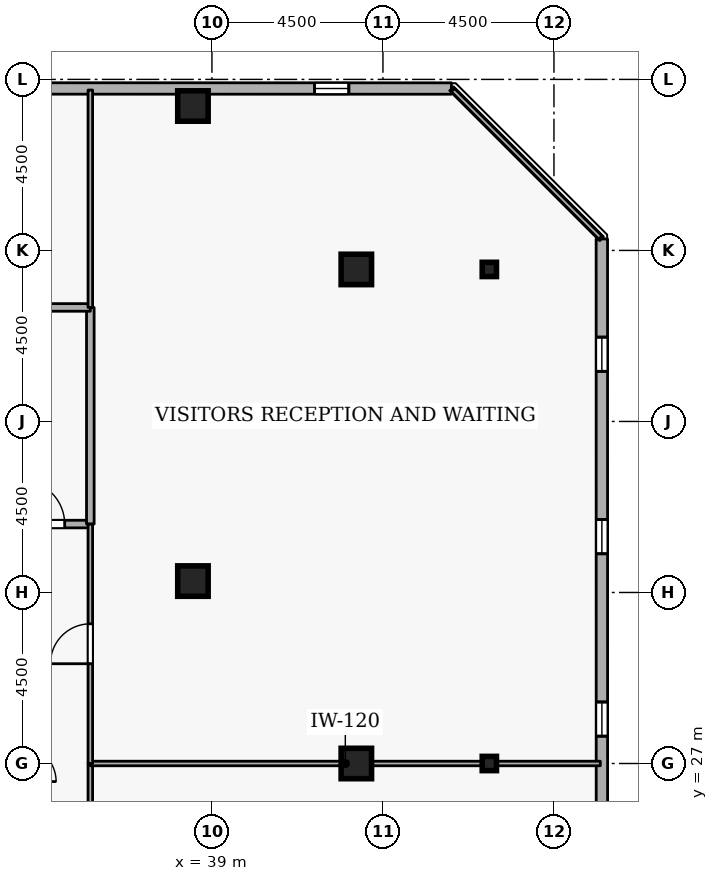
"""IFC4 building model, lengths in metres.
Left out: names, types, materials, properties, quantities, classifications, styles, units other than length and angle.
Written with IfcOpenShell. Run it as: python <this file> out.ifc"""

import sys

from ifc_helpers import new_model, si_unit, direction, frame, frame_2d, origin, origin_2d, place, context, subcontext, project, spatial, rectangle, i_section, extrude, element, fill, save


model = new_model("IFC4")
c1 = context("Model", 3, precision=1e-05, world=origin(), true_north=direction((0.0, 1.0)))
c2 = subcontext(c1, "Body", "Model", "MODEL_VIEW")
j1 = project(units=[si_unit("LENGTHUNIT", "METRE"), si_unit("PLANEANGLEUNIT", "RADIAN")], contexts=[c1])
p1 = place(None, origin())
s1 = spatial("IfcSite", under=j1, at=p1, CompositionType="ELEMENT")
p2 = place(p1, origin())
s2 = spatial("IfcBuilding", under=s1, at=p2, CompositionType="ELEMENT")
p3 = place(p2, frame((0.0, 0.0, 258.3)))
s3 = spatial("IfcBuildingStorey", under=s2, at=p3, CompositionType="ELEMENT", Elevation=258.3)
for number, where, z_axis, x_axis in (
    (1, (42.8, 27.0, 0.0), (0.0, 0.0, 1.0), (1.0, 0.0, 0.0)),
    (2, (42.8, 40.0, 0.0), (0.0, 0.0, 1.0), (1.0, 0.0, 0.0)),
    (3, (38.5, 44.3, 0.0), (0.0, 0.0, 1.0), (1.0, 0.0, 0.0)),
    (4, (38.5, 31.8, 0.0), (0.0, 0.0, 1.0), (1.0, 0.0, 0.0)),
):
    element("IfcColumn", number, at=place(p3, frame(where, z_axis=z_axis, x_axis=x_axis)), inside=s3, PredefinedType="COLUMN", context=c2, shape_type="SweptSolid", body=[
        extrude(rectangle(XDim=0.8, YDim=0.8, at=origin_2d()), origin(), (0.0, 0.0, 1.0), 3.6),
    ])
for number, where, z_axis, x_axis in (
    (5, (46.3, 27.0, 0.0), (0.0, 0.0, 1.0), (1.0, 0.0, 0.0)),
    (6, (46.3, 40.0, 0.0), (0.0, 0.0, 1.0), (1.0, 0.0, 0.0)),
):
    element("IfcColumn", number, at=place(p3, frame(where, z_axis=z_axis, x_axis=x_axis)), inside=s3, PredefinedType="COLUMN", context=c2, shape_type="SweptSolid", body=[
        extrude(i_section(OverallWidth=0.375, OverallDepth=0.375, WebThickness=0.017, FlangeThickness=0.027, FilletRadius=0.015, at=origin_2d()), origin(), (0.0, 0.0, 1.0), 3.6),
    ])
p4 = place(p3, frame((49.265, 5.819, 0.0), z_axis=(0.0, 0.0, 1.0), x_axis=(-0.000132597301, 0.999999991209, 0.0)))
e7 = element("IfcWall", 7, at=p4, inside=s3, PredefinedType="STANDARD", context=c2, shape_type="SweptSolid", body=[
    extrude(rectangle(XDim=34.983, YDim=0.3, at=frame_2d((17.492, 0.0))), origin(), (0.0, 0.0, 1.0), 2.7),
])
p5 = place(p4, frame((2.7, 0.0, 0.72)))
e8 = element("IfcOpeningElement", 8, at=p5, cuts=e7, PredefinedType="OPENING", context=c2, shape_type="SweptSolid", body=[
    extrude(rectangle(XDim=0.9, YDim=1.75, at=frame_2d((0.45, 0.875))), frame((0.0, 0.16, 0.0), z_axis=(0.0, -1.0, 0.0), x_axis=(1.0, 0.0, 0.0)), (0.0, 0.0, 1.0), 0.32),
])
p6 = place(p4, frame((7.5, 0.0, 0.72)))
e9 = element("IfcOpeningElement", 9, at=p6, cuts=e7, PredefinedType="OPENING", context=c2, shape_type="SweptSolid", body=[
    extrude(rectangle(XDim=0.9, YDim=1.75, at=frame_2d((0.45, 0.875))), frame((0.0, 0.16, 0.0), z_axis=(0.0, -1.0, 0.0), x_axis=(1.0, 0.0, 0.0)), (0.0, 0.0, 1.0), 0.32),
])
p7 = place(p4, frame((12.3, 0.0, 0.72)))
e10 = element("IfcOpeningElement", 10, at=p7, cuts=e7, PredefinedType="OPENING", context=c2, shape_type="SweptSolid", body=[
    extrude(rectangle(XDim=0.9, YDim=1.75, at=frame_2d((0.45, 0.875))), frame((0.0, 0.16, 0.0), z_axis=(0.0, -1.0, 0.0), x_axis=(1.0, 0.0, 0.0)), (0.0, 0.0, 1.0), 0.32),
])
p8 = place(p4, frame((17.1, 0.0, 0.72)))
e11 = element("IfcOpeningElement", 11, at=p8, cuts=e7, PredefinedType="OPENING", context=c2, shape_type="SweptSolid", body=[
    extrude(rectangle(XDim=0.9, YDim=1.75, at=frame_2d((0.45, 0.875))), frame((0.0, 0.16, 0.0), z_axis=(0.0, -1.0, 0.0), x_axis=(1.0, 0.0, 0.0)), (0.0, 0.0, 1.0), 0.32),
])
p9 = place(p4, frame((21.9, 0.0, 0.72)))
e12 = element("IfcOpeningElement", 12, at=p9, cuts=e7, PredefinedType="OPENING", context=c2, shape_type="SweptSolid", body=[
    extrude(rectangle(XDim=0.9, YDim=1.75, at=frame_2d((0.45, 0.875))), frame((0.0, 0.16, 0.0), z_axis=(0.0, -1.0, 0.0), x_axis=(1.0, 0.0, 0.0)), (0.0, 0.0, 1.0), 0.32),
])
p10 = place(p4, frame((26.7, 0.0, 0.72)))
e13 = element("IfcOpeningElement", 13, at=p10, cuts=e7, PredefinedType="OPENING", context=c2, shape_type="SweptSolid", body=[
    extrude(rectangle(XDim=0.9, YDim=1.75, at=frame_2d((0.45, 0.875))), frame((0.0, 0.16, 0.0), z_axis=(0.0, -1.0, 0.0), x_axis=(1.0, 0.0, 0.0)), (0.0, 0.0, 1.0), 0.32),
])
p11 = place(p4, frame((31.5, 0.0, 0.72)))
e14 = element("IfcOpeningElement", 14, at=p11, cuts=e7, PredefinedType="OPENING", context=c2, shape_type="SweptSolid", body=[
    extrude(rectangle(XDim=0.9, YDim=1.75, at=frame_2d((0.45, 0.875))), frame((0.0, 0.16, 0.0), z_axis=(0.0, -1.0, 0.0), x_axis=(1.0, 0.0, 0.0)), (0.0, 0.0, 1.0), 0.32),
])
p12 = place(p3, frame((45.302, 44.76, 0.0), z_axis=(0.0, 0.0, 1.0), x_axis=(-0.999999991209, 0.000132597301, 0.0)))
e15 = element("IfcWall", 15, at=p12, inside=s3, PredefinedType="STANDARD", context=c2, shape_type="SweptSolid", body=[
    extrude(rectangle(XDim=34.983, YDim=0.3, at=frame_2d((17.492, 0.0))), origin(), (0.0, 0.0, 1.0), 2.7),
])
p13 = place(p12, frame((2.7, 0.0, 0.72)))
e16 = element("IfcOpeningElement", 16, at=p13, cuts=e15, PredefinedType="OPENING", context=c2, shape_type="SweptSolid", body=[
    extrude(rectangle(XDim=0.9, YDim=1.75, at=frame_2d((0.45, 0.875))), frame((0.0, 0.16, 0.0), z_axis=(0.0, -1.0, 0.0), x_axis=(1.0, 0.0, 0.0)), (0.0, 0.0, 1.0), 0.32),
])
p14 = place(p12, frame((12.3, 0.0, 0.72)))
e17 = element("IfcOpeningElement", 17, at=p14, cuts=e15, PredefinedType="OPENING", context=c2, shape_type="SweptSolid", body=[
    extrude(rectangle(XDim=0.9, YDim=1.75, at=frame_2d((0.45, 0.875))), frame((0.0, 0.16, 0.0), z_axis=(0.0, -1.0, 0.0), x_axis=(1.0, 0.0, 0.0)), (0.0, 0.0, 1.0), 0.32),
])
p15 = place(p12, frame((17.1, 0.0, 0.72)))
e18 = element("IfcOpeningElement", 18, at=p15, cuts=e15, PredefinedType="OPENING", context=c2, shape_type="SweptSolid", body=[
    extrude(rectangle(XDim=0.9, YDim=1.75, at=frame_2d((0.45, 0.875))), frame((0.0, 0.16, 0.0), z_axis=(0.0, -1.0, 0.0), x_axis=(1.0, 0.0, 0.0)), (0.0, 0.0, 1.0), 0.32),
])
p16 = place(p12, frame((21.9, 0.0, 0.72)))
e19 = element("IfcOpeningElement", 19, at=p16, cuts=e15, PredefinedType="OPENING", context=c2, shape_type="SweptSolid", body=[
    extrude(rectangle(XDim=0.9, YDim=1.75, at=frame_2d((0.45, 0.875))), frame((0.0, 0.16, 0.0), z_axis=(0.0, -1.0, 0.0), x_axis=(1.0, 0.0, 0.0)), (0.0, 0.0, 1.0), 0.32),
])
p17 = place(p3, frame((33.3, 33.3, 0.0), z_axis=(0.0, 0.0, 1.0), x_axis=(1.0, 0.0, 0.0)))
e20 = element("IfcWall", 20, at=p17, inside=s3, PredefinedType="STANDARD", context=c2, shape_type="SweptSolid", body=[
    extrude(rectangle(XDim=2.5, YDim=0.2, at=frame_2d((1.25, 0.0))), origin(), (0.0, 0.0, 1.0), 3.34),
])
p18 = place(p17, frame((0.675, 0.0, 0.0)))
e21 = element("IfcOpeningElement", 21, at=p18, cuts=e20, PredefinedType="OPENING", context=c2, shape_type="SweptSolid", body=[
    extrude(rectangle(XDim=1.15, YDim=2.1, at=frame_2d((0.575, 1.05))), frame((0.0, 0.11, 0.0), z_axis=(0.0, -1.0, 0.0), x_axis=(1.0, 0.0, 0.0)), (0.0, 0.0, 1.0), 0.22),
])
p19 = place(p3, frame((35.8, 33.3, 0.0), z_axis=(0.0, 0.0, 1.0), x_axis=(0.0, 1.0, 0.0)))
e22 = element("IfcWall", 22, at=p19, inside=s3, PredefinedType="STANDARD", context=c2, shape_type="SweptSolid", body=[
    extrude(rectangle(XDim=5.7, YDim=0.2, at=frame_2d((2.85, 0.0))), origin(), (0.0, 0.0, 1.0), 3.34),
])
p20 = place(p3, frame((35.8, 39.0, 0.0), z_axis=(0.0, 0.0, 1.0), x_axis=(-1.0, 0.0, 0.0)))
e23 = element("IfcWall", 23, at=p20, inside=s3, PredefinedType="STANDARD", context=c2, shape_type="SweptSolid", body=[
    extrude(rectangle(XDim=2.5, YDim=0.2, at=frame_2d((1.25, 0.0))), origin(), (0.0, 0.0, 1.0), 3.34),
])
p21 = place(p3, frame((35.8, 14.8, 0.0), z_axis=(0.0, 0.0, 1.0), x_axis=(0.0, 1.0, 0.0)))
e24 = element("IfcWall", 24, at=p21, inside=s3, PredefinedType="PARTITIONING", context=c2, shape_type="SweptSolid", body=[
    extrude(rectangle(XDim=12.2, YDim=0.12, at=frame_2d((6.1, 0.0))), origin(), (0.0, 0.0, 1.0), 3.34),
])
p22 = place(p21, frame((5.575, 0.0, 0.0)))
e25 = element("IfcOpeningElement", 25, at=p22, cuts=e24, PredefinedType="OPENING", context=c2, shape_type="SweptSolid", body=[
    extrude(rectangle(XDim=1.05, YDim=2.1, at=frame_2d((0.525, 1.05))), frame((0.0, 0.07, 0.0), z_axis=(0.0, -1.0, 0.0), x_axis=(1.0, 0.0, 0.0)), (0.0, 0.0, 1.0), 0.14),
])
p23 = place(p3, frame((35.8, 27.0, 0.0), z_axis=(0.0, 0.0, 1.0), x_axis=(1.0, 0.0, 0.0)))
e26 = element("IfcWall", 26, at=p23, inside=s3, PredefinedType="PARTITIONING", context=c2, shape_type="SweptSolid", body=[
    extrude(rectangle(XDim=13.42, YDim=0.12, at=frame_2d((6.71, 0.0))), origin(), (0.0, 0.0, 1.0), 2.932),
])
p24 = place(p3, frame((35.8, 39.0, 0.0), z_axis=(0.0, 0.0, 1.0), x_axis=(0.0, 1.0, 0.0)))
e27 = element("IfcWall", 27, at=p24, inside=s3, PredefinedType="PARTITIONING", context=c2, shape_type="SweptSolid", body=[
    extrude(rectangle(XDim=5.72, YDim=0.12, at=frame_2d((2.86, 0.0))), origin(), (0.0, 0.0, 1.0), 3.34),
])
p25 = place(p3, frame((45.34, 44.72, 0.0), z_axis=(0.0, 0.0, 1.0), x_axis=(0.707106781187, -0.707106781187, 0.0)))
e28 = element("IfcWall", 28, at=p25, inside=s3, PredefinedType="PARTITIONING", context=c2, shape_type="SweptSolid", body=[
    extrude(rectangle(XDim=5.487, YDim=0.12, at=frame_2d((2.743, 0.0))), origin(), (0.0, 0.0, 1.0), 3.34),
])
p26 = place(p3, frame((35.8, 27.0, 0.0), z_axis=(0.0, 0.0, 1.0), x_axis=(0.0, 1.0, 0.0)))
e29 = element("IfcWall", 29, at=p26, inside=s3, PredefinedType="PARTITIONING", context=c2, shape_type="SweptSolid", body=[
    extrude(rectangle(XDim=6.3, YDim=0.12, at=frame_2d((3.15, 0.0))), origin(), (0.0, 0.0, 1.0), 3.34),
])
p27 = place(p26, frame((2.625, 0.0, 0.0)))
e30 = element("IfcOpeningElement", 30, at=p27, cuts=e29, PredefinedType="OPENING", context=c2, shape_type="SweptSolid", body=[
    extrude(rectangle(XDim=1.05, YDim=2.1, at=frame_2d((0.525, 1.05))), frame((0.0, 0.07, 0.0), z_axis=(0.0, -1.0, 0.0), x_axis=(1.0, 0.0, 0.0)), (0.0, 0.0, 1.0), 0.14),
])
p28 = place(p9, origin())
e31 = element("IfcWindow", 31, at=p28, inside=s3, PartitioningType="SINGLE_PANEL", PredefinedType="WINDOW", context=c2, shape_type="SweptSolid", body=[
    extrude(rectangle(XDim=0.9, YDim=1.75, at=frame_2d((0.45, 0.875))), frame((0.0, 0.03, 0.0), z_axis=(0.0, -1.0, 0.0), x_axis=(1.0, 0.0, 0.0)), (0.0, 0.0, 1.0), 0.06),
])
fill(e12, e31)
p29 = place(p10, origin())
e32 = element("IfcWindow", 32, at=p29, inside=s3, PartitioningType="SINGLE_PANEL", PredefinedType="WINDOW", context=c2, shape_type="SweptSolid", body=[
    extrude(rectangle(XDim=0.9, YDim=1.75, at=frame_2d((0.45, 0.875))), frame((0.0, 0.03, 0.0), z_axis=(0.0, -1.0, 0.0), x_axis=(1.0, 0.0, 0.0)), (0.0, 0.0, 1.0), 0.06),
])
fill(e13, e32)
p30 = place(p11, origin())
e33 = element("IfcWindow", 33, at=p30, inside=s3, PartitioningType="SINGLE_PANEL", PredefinedType="WINDOW", context=c2, shape_type="SweptSolid", body=[
    extrude(rectangle(XDim=0.9, YDim=1.75, at=frame_2d((0.45, 0.875))), frame((0.0, 0.03, 0.0), z_axis=(0.0, -1.0, 0.0), x_axis=(1.0, 0.0, 0.0)), (0.0, 0.0, 1.0), 0.06),
])
fill(e14, e33)
p31 = place(p13, origin())
e34 = element("IfcWindow", 34, at=p31, inside=s3, PartitioningType="SINGLE_PANEL", PredefinedType="WINDOW", context=c2, shape_type="SweptSolid", body=[
    extrude(rectangle(XDim=0.9, YDim=1.75, at=frame_2d((0.45, 0.875))), frame((0.0, 0.03, 0.0), z_axis=(0.0, -1.0, 0.0), x_axis=(1.0, 0.0, 0.0)), (0.0, 0.0, 1.0), 0.06),
])
fill(e16, e34)
p32 = place(p18, origin())
e35 = element("IfcDoor", 35, at=p32, inside=s3, OperationType="SINGLE_SWING_LEFT", PredefinedType="DOOR", context=c2, shape_type="SweptSolid", body=[
    extrude(rectangle(XDim=1.15, YDim=2.1, at=frame_2d((0.575, 1.05))), frame((0.0, 0.025, 0.0), z_axis=(0.0, -1.0, 0.0), x_axis=(1.0, 0.0, 0.0)), (0.0, 0.0, 1.0), 0.05),
])
fill(e21, e35)
p33 = place(p27, origin())
e36 = element("IfcDoor", 36, at=p33, inside=s3, OperationType="SINGLE_SWING_LEFT", PredefinedType="DOOR", context=c2, shape_type="SweptSolid", body=[
    extrude(rectangle(XDim=1.05, YDim=2.1, at=frame_2d((0.525, 1.05))), frame((0.0, 0.025, 0.0), z_axis=(0.0, -1.0, 0.0), x_axis=(1.0, 0.0, 0.0)), (0.0, 0.0, 1.0), 0.05),
])
fill(e30, e36)
save(model, sys.argv[1])
